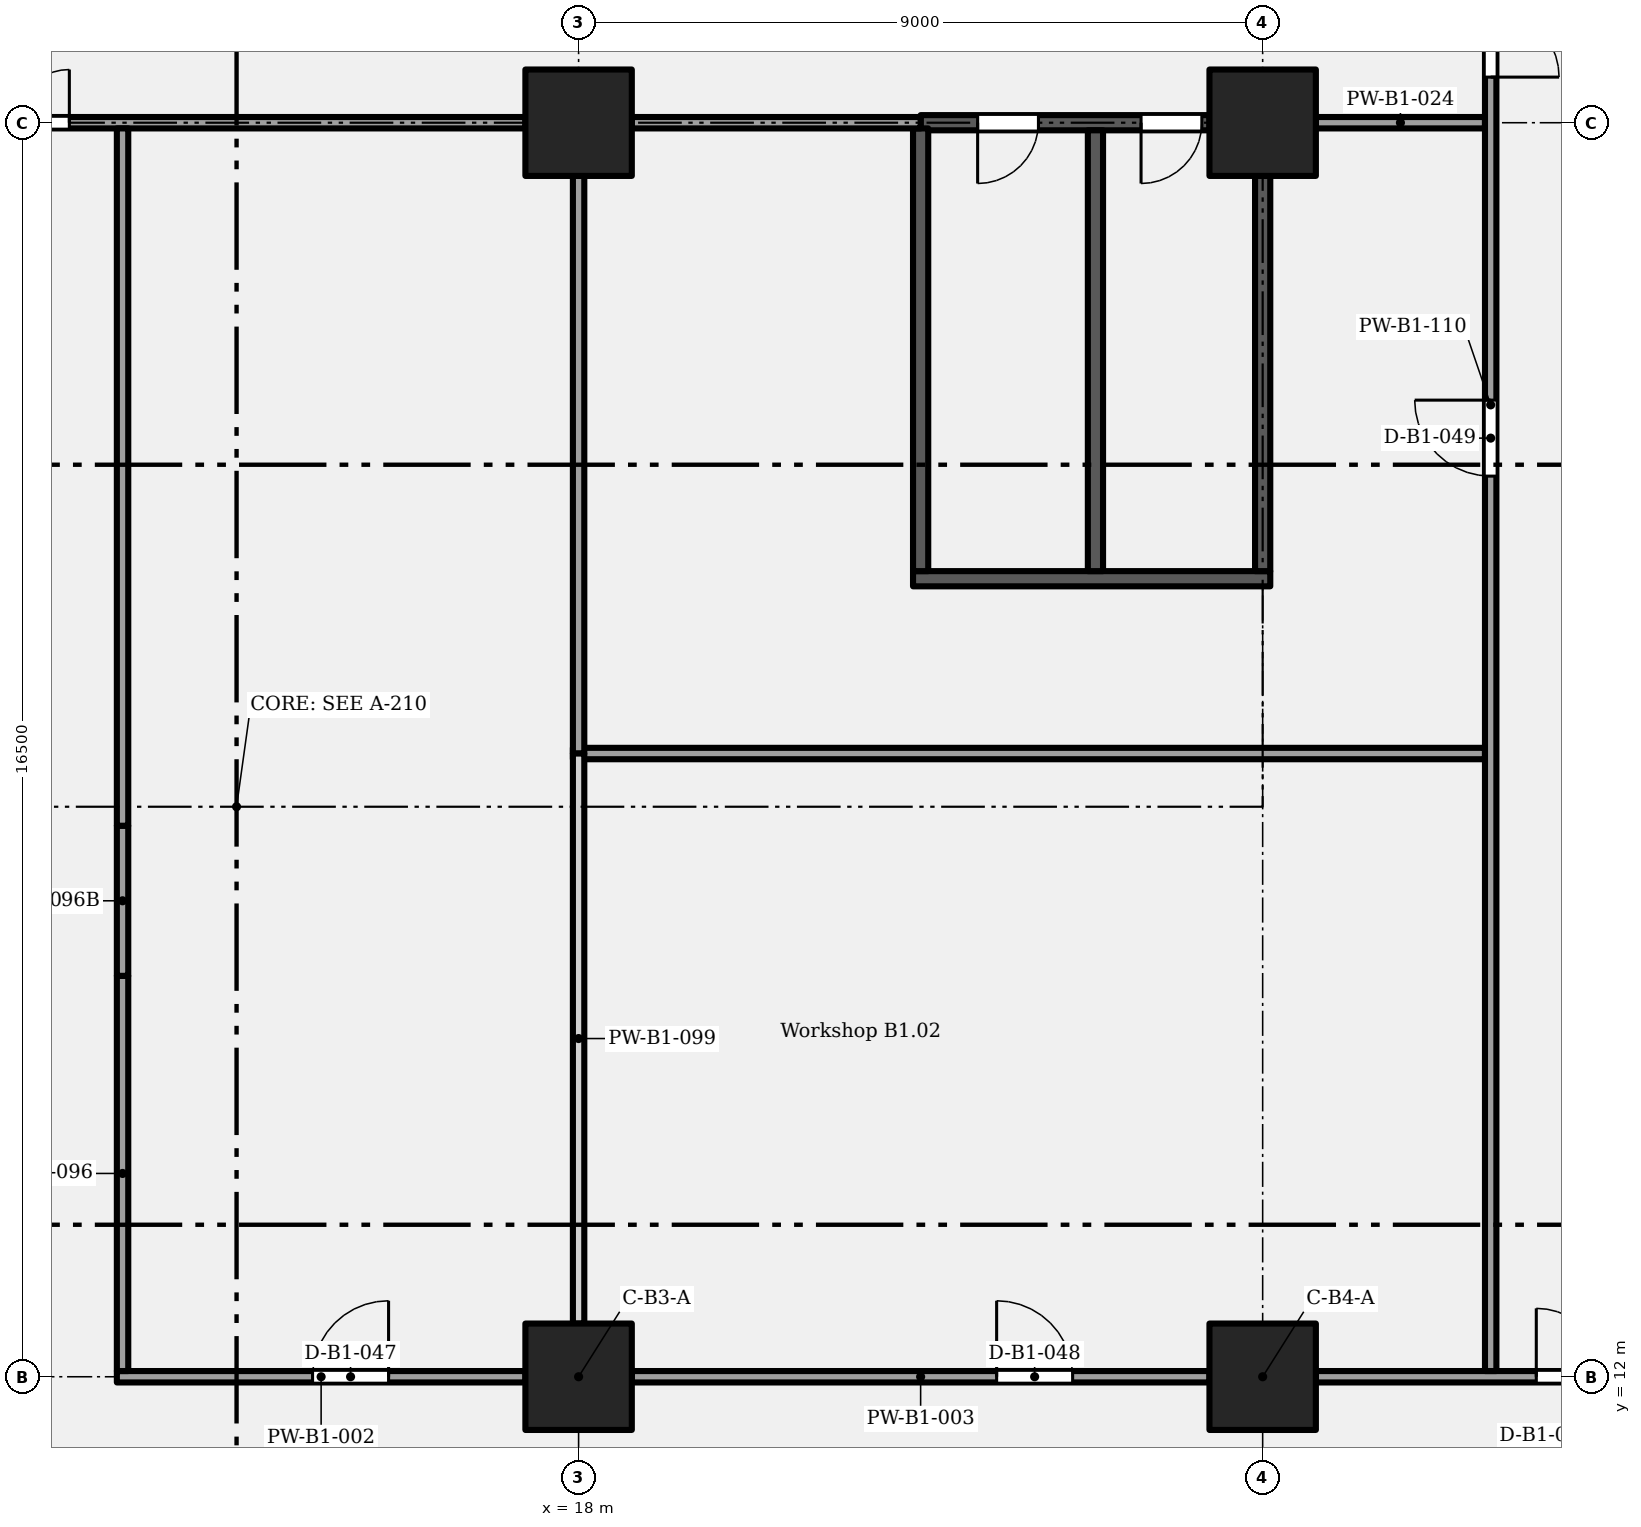
"""IFC4 building model, lengths in metres.
Left out: names, types, materials, properties, quantities, classifications, styles, units other than length and angle.
Written with IfcOpenShell. Run it as: python <this file> out.ifc"""

import sys

from ifc_helpers import new_model, si_unit, direction, frame, frame_2d, origin, origin_2d, place, context, subcontext, project, spatial, rectangle, extrude, element, fill, save


model = new_model("IFC4")
c1 = context("Model", 3, precision=1e-05, world=origin(), true_north=direction((0.0, 1.0)))
c2 = subcontext(c1, "Body", "Model", "MODEL_VIEW")
j1 = project(units=[si_unit("LENGTHUNIT", "METRE"), si_unit("PLANEANGLEUNIT", "RADIAN")], contexts=[c1])
p1 = place(None, origin())
s1 = spatial("IfcSite", under=j1, at=p1, CompositionType="ELEMENT")
p2 = place(p1, origin())
s2 = spatial("IfcBuilding", under=s1, at=p2, CompositionType="ELEMENT")
p3 = place(p2, frame((0.0, 0.0, -4.2)))
s3 = spatial("IfcBuildingStorey", under=s2, at=p3, CompositionType="ELEMENT", Elevation=-4.2)
for number, where, z_axis, x_axis in (
    (1, (18.0, 12.0, 0.0), (0.0, 0.0, 1.0), (1.0, 0.0, 0.0)),
    (2, (27.0, 12.0, 0.0), (0.0, 0.0, 1.0), (1.0, 0.0, 0.0)),
    (3, (18.0, 28.5, 0.0), (0.0, 0.0, 1.0), (1.0, 0.0, 0.0)),
    (4, (27.0, 28.5, 0.0), (0.0, 0.0, 1.0), (1.0, 0.0, 0.0)),
):
    element("IfcColumn", number, at=place(p3, frame(where, z_axis=z_axis, x_axis=x_axis)), inside=s3, PredefinedType="COLUMN", context=c2, shape_type="SweptSolid", body=[
        extrude(rectangle(XDim=1.4, YDim=1.4, at=origin_2d()), origin(), (0.0, 0.0, 1.0), 4.2),
    ])
p4 = place(p3, frame((11.925, 12.0, 0.0), z_axis=(0.0, 0.0, 1.0), x_axis=(1.0, 0.0, 0.0)))
e5 = element("IfcWall", 5, at=p4, inside=s3, PredefinedType="PARTITIONING", context=c2, shape_type="SweptSolid", body=[
    extrude(rectangle(XDim=5.375, YDim=0.15, at=frame_2d((2.688, 0.0))), origin(), (0.0, 0.0, 1.0), 3.15),
])
p5 = place(p4, frame((2.575, 0.0, 0.0)))
e6 = element("IfcOpeningElement", 6, at=p5, cuts=e5, PredefinedType="OPENING", context=c2, shape_type="SweptSolid", body=[
    extrude(rectangle(XDim=1.0, YDim=2.1, at=frame_2d((0.5, 1.05))), frame((0.0, 0.085, 0.0), z_axis=(0.0, -1.0, 0.0), x_axis=(1.0, 0.0, 0.0)), (0.0, 0.0, 1.0), 0.17),
])
p6 = place(p3, frame((18.7, 12.0, 0.0), z_axis=(0.0, 0.0, 1.0), x_axis=(1.0, 0.0, 0.0)))
e7 = element("IfcWall", 7, at=p6, inside=s3, PredefinedType="PARTITIONING", context=c2, shape_type="SweptSolid", body=[
    extrude(rectangle(XDim=7.6, YDim=0.15, at=frame_2d((3.8, 0.0))), origin(), (0.0, 0.0, 1.0), 3.15),
])
p7 = place(p6, frame((4.8, 0.0, 0.0)))
e8 = element("IfcOpeningElement", 8, at=p7, cuts=e7, PredefinedType="OPENING", context=c2, shape_type="SweptSolid", body=[
    extrude(rectangle(XDim=1.0, YDim=2.1, at=frame_2d((0.5, 1.05))), frame((0.0, 0.085, 0.0), z_axis=(0.0, -1.0, 0.0), x_axis=(1.0, 0.0, 0.0)), (0.0, 0.0, 1.0), 0.17),
])
p8 = place(p3, frame((27.7, 12.0, 0.0), z_axis=(0.0, 0.0, 1.0), x_axis=(1.0, 0.0, 0.0)))
e9 = element("IfcWall", 9, at=p8, inside=s3, PredefinedType="PARTITIONING", context=c2, shape_type="SweptSolid", body=[
    extrude(rectangle(XDim=7.75, YDim=0.15, at=frame_2d((3.875, 0.0))), origin(), (0.0, 0.0, 1.0), 3.15),
])
p9 = place(p8, frame((2.9, 0.0, 0.0)))
e10 = element("IfcOpeningElement", 10, at=p9, cuts=e9, PredefinedType="OPENING", context=c2, shape_type="SweptSolid", body=[
    extrude(rectangle(XDim=1.8, YDim=2.1, at=frame_2d((0.9, 1.05))), frame((0.0, 0.085, 0.0), z_axis=(0.0, -1.0, 0.0), x_axis=(1.0, 0.0, 0.0)), (0.0, 0.0, 1.0), 0.17),
])
p10 = place(p3, frame((17.925, 20.2, 0.0), z_axis=(0.0, 0.0, 1.0), x_axis=(1.0, 0.0, 0.0)))
e11 = element("IfcWall", 11, at=p10, inside=s3, PredefinedType="PARTITIONING", context=c2, shape_type="SweptSolid", body=[
    extrude(rectangle(XDim=12.0, YDim=0.15, at=frame_2d((6.0, 0.0))), origin(), (0.0, 0.0, 1.0), 3.9),
])
p11 = place(p3, frame((22.4, 22.5, 0.0), z_axis=(0.0, 0.0, 1.0), x_axis=(1.0, 0.0, 0.0)))
e12 = element("IfcWall", 12, at=p11, inside=s3, PredefinedType="SHEAR", context=c2, shape_type="SweptSolid", body=[
    extrude(rectangle(XDim=4.7, YDim=0.2, at=frame_2d((2.35, 0.0))), origin(), (0.0, 0.0, 1.0), 3.9),
])
p12 = place(p3, frame((9.7, 28.5, 0.0), z_axis=(0.0, 0.0, 1.0), x_axis=(1.0, 0.0, 0.0)))
e13 = element("IfcWall", 13, at=p12, inside=s3, PredefinedType="PARTITIONING", context=c2, shape_type="SweptSolid", body=[
    extrude(rectangle(XDim=7.6, YDim=0.15, at=frame_2d((3.8, 0.0))), origin(), (0.0, 0.0, 1.0), 3.15),
])
p13 = place(p12, frame((0.2, 0.0, 0.0)))
e14 = element("IfcOpeningElement", 14, at=p13, cuts=e13, PredefinedType="OPENING", context=c2, shape_type="SweptSolid", body=[
    extrude(rectangle(XDim=1.4, YDim=2.1, at=frame_2d((0.7, 1.05))), frame((0.0, 0.085, 0.0), z_axis=(0.0, -1.0, 0.0), x_axis=(1.0, 0.0, 0.0)), (0.0, 0.0, 1.0), 0.17),
])
p14 = place(p3, frame((18.7, 28.5, 0.0), z_axis=(0.0, 0.0, 1.0), x_axis=(1.0, 0.0, 0.0)))
e15 = element("IfcWall", 15, at=p14, inside=s3, PredefinedType="PARTITIONING", context=c2, shape_type="SweptSolid", body=[
    extrude(rectangle(XDim=3.8, YDim=0.15, at=frame_2d((1.9, 0.0))), origin(), (0.0, 0.0, 1.0), 3.15),
])
p15 = place(p3, frame((22.5, 28.5, 0.0), z_axis=(0.0, 0.0, 1.0), x_axis=(1.0, 0.0, 0.0)))
e16 = element("IfcWall", 16, at=p15, inside=s3, PredefinedType="SHEAR", context=c2, shape_type="SweptSolid", body=[
    extrude(rectangle(XDim=3.8, YDim=0.2, at=frame_2d((1.9, 0.0))), origin(), (0.0, 0.0, 1.0), 3.9),
])
p16 = place(p15, frame((1.55, 0.0, 0.0), z_axis=(0.0, 0.0, 1.0), x_axis=(-1.0, 0.0, 0.0)))
e17 = element("IfcOpeningElement", 17, at=p16, cuts=e16, PredefinedType="OPENING", context=c2, shape_type="SweptSolid", body=[
    extrude(rectangle(XDim=0.8, YDim=2.0, at=frame_2d((0.4, 1.0))), frame((0.0, 0.11, 0.0), z_axis=(0.0, -1.0, 0.0), x_axis=(1.0, 0.0, 0.0)), (0.0, 0.0, 1.0), 0.22),
])
p17 = place(p15, frame((3.7, 0.0, 0.0), z_axis=(0.0, 0.0, 1.0), x_axis=(-1.0, 0.0, 0.0)))
e18 = element("IfcOpeningElement", 18, at=p17, cuts=e16, PredefinedType="OPENING", context=c2, shape_type="SweptSolid", body=[
    extrude(rectangle(XDim=0.8, YDim=2.0, at=frame_2d((0.4, 1.0))), frame((0.0, 0.11, 0.0), z_axis=(0.0, -1.0, 0.0), x_axis=(1.0, 0.0, 0.0)), (0.0, 0.0, 1.0), 0.22),
])
p18 = place(p3, frame((27.7, 28.5, 0.0), z_axis=(0.0, 0.0, 1.0), x_axis=(1.0, 0.0, 0.0)))
e19 = element("IfcWall", 19, at=p18, inside=s3, PredefinedType="PARTITIONING", context=c2, shape_type="SweptSolid", body=[
    extrude(rectangle(XDim=2.225, YDim=0.15, at=frame_2d((1.113, 0.0))), origin(), (0.0, 0.0, 1.0), 3.15),
])
p19 = place(p3, frame((12.0, 12.075, 0.0), z_axis=(0.0, 0.0, 1.0), x_axis=(0.0, 1.0, 0.0)))
e20 = element("IfcWall", 20, at=p19, inside=s3, PredefinedType="PARTITIONING", context=c2, shape_type="SweptSolid", body=[
    extrude(rectangle(XDim=5.2, YDim=0.15, at=frame_2d((2.6, 0.0))), origin(), (0.0, 0.0, 1.0), 3.9),
])
p20 = place(p3, frame((18.0, 12.7, 0.0), z_axis=(0.0, 0.0, 1.0), x_axis=(0.0, 1.0, 0.0)))
e21 = element("IfcWall", 21, at=p20, inside=s3, PredefinedType="PARTITIONING", context=c2, shape_type="SweptSolid", body=[
    extrude(rectangle(XDim=7.5, YDim=0.15, at=frame_2d((3.75, 0.0))), origin(), (0.0, 0.0, 1.0), 2.95),
])
p21 = place(p3, frame((18.0, 20.2, 0.0), z_axis=(0.0, 0.0, 1.0), x_axis=(0.0, 1.0, 0.0)))
e22 = element("IfcWall", 22, at=p21, inside=s3, PredefinedType="PARTITIONING", context=c2, shape_type="SweptSolid", body=[
    extrude(rectangle(XDim=7.6, YDim=0.15, at=frame_2d((3.8, 0.0))), origin(), (0.0, 0.0, 1.0), 2.95),
])
p22 = place(p3, frame((22.5, 22.6, 0.0), z_axis=(0.0, 0.0, 1.0), x_axis=(0.0, 1.0, 0.0)))
e23 = element("IfcWall", 23, at=p22, inside=s3, PredefinedType="SHEAR", context=c2, shape_type="SweptSolid", body=[
    extrude(rectangle(XDim=5.825, YDim=0.2, at=frame_2d((2.913, 0.0))), origin(), (0.0, 0.0, 1.0), 3.9),
])
p23 = place(p3, frame((24.8, 22.6, 0.0), z_axis=(0.0, 0.0, 1.0), x_axis=(0.0, 1.0, 0.0)))
e24 = element("IfcWall", 24, at=p23, inside=s3, PredefinedType="SHEAR", context=c2, shape_type="SweptSolid", body=[
    extrude(rectangle(XDim=5.8, YDim=0.2, at=frame_2d((2.9, 0.0))), origin(), (0.0, 0.0, 1.0), 3.9),
])
p24 = place(p3, frame((27.0, 22.6, 0.0), z_axis=(0.0, 0.0, 1.0), x_axis=(0.0, 1.0, 0.0)))
e25 = element("IfcWall", 25, at=p24, inside=s3, PredefinedType="SHEAR", context=c2, shape_type="SweptSolid", body=[
    extrude(rectangle(XDim=5.2, YDim=0.2, at=frame_2d((2.6, 0.0))), origin(), (0.0, 0.0, 1.0), 3.9),
])
p25 = place(p3, frame((30.0, 12.075, 0.0), z_axis=(0.0, 0.0, 1.0), x_axis=(0.0, 1.0, 0.0)))
e26 = element("IfcWall", 26, at=p25, inside=s3, PredefinedType="PARTITIONING", context=c2, shape_type="SweptSolid", body=[
    extrude(rectangle(XDim=25.425, YDim=0.15, at=frame_2d((12.712, 0.0))), origin(), (0.0, 0.0, 1.0), 3.9),
])
p26 = place(p25, frame((18.825, 0.0, 0.0), z_axis=(0.0, 0.0, 1.0), x_axis=(-1.0, 0.0, 0.0)))
e27 = element("IfcOpeningElement", 27, at=p26, cuts=e26, PredefinedType="OPENING", context=c2, shape_type="SweptSolid", body=[
    extrude(rectangle(XDim=1.8, YDim=2.1, at=frame_2d((0.9, 1.05))), frame((0.0, 0.085, 0.0), z_axis=(0.0, -1.0, 0.0), x_axis=(1.0, 0.0, 0.0)), (0.0, 0.0, 1.0), 0.17),
])
p27 = place(p25, frame((11.775, 0.0, 0.0)))
e28 = element("IfcOpeningElement", 28, at=p27, cuts=e26, PredefinedType="OPENING", context=c2, shape_type="SweptSolid", body=[
    extrude(rectangle(XDim=1.0, YDim=2.1, at=frame_2d((0.5, 1.05))), frame((0.0, 0.085, 0.0), z_axis=(0.0, -1.0, 0.0), x_axis=(1.0, 0.0, 0.0)), (0.0, 0.0, 1.0), 0.17),
])
p28 = place(p3, frame((12.0, 17.275, 0.0), z_axis=(0.0, 0.0, 1.0), x_axis=(0.0, 1.0, 0.0)))
e29 = element("IfcWall", 29, at=p28, inside=s3, PredefinedType="PARTITIONING", context=c2, shape_type="SweptSolid", body=[
    extrude(rectangle(XDim=1.975, YDim=0.15, at=frame_2d((0.988, 0.0))), origin(), (0.0, 0.0, 1.0), 3.4),
])
p29 = place(p3, frame((12.0, 19.25, 0.0), z_axis=(0.0, 0.0, 1.0), x_axis=(0.0, 1.0, 0.0)))
e30 = element("IfcWall", 30, at=p29, inside=s3, PredefinedType="PARTITIONING", context=c2, shape_type="SweptSolid", body=[
    extrude(rectangle(XDim=9.175, YDim=0.15, at=frame_2d((4.587, 0.0))), origin(), (0.0, 0.0, 1.0), 3.9),
])
p30 = place(p13, origin())
e31 = element("IfcDoor", 31, at=p30, inside=s3, OperationType="DOUBLE_DOOR_SINGLE_SWING", PredefinedType="DOOR", context=c2, shape_type="SweptSolid", body=[
    extrude(rectangle(XDim=1.4, YDim=2.1, at=frame_2d((0.7, 1.05))), frame((0.0, 0.025, 0.0), z_axis=(0.0, -1.0, 0.0), x_axis=(1.0, 0.0, 0.0)), (0.0, 0.0, 1.0), 0.05),
])
fill(e14, e31)
p31 = place(p9, origin())
e32 = element("IfcDoor", 32, at=p31, inside=s3, OperationType="DOUBLE_DOOR_SINGLE_SWING", PredefinedType="DOOR", context=c2, shape_type="SweptSolid", body=[
    extrude(rectangle(XDim=1.8, YDim=2.1, at=frame_2d((0.9, 1.05))), frame((0.0, 0.025, 0.0), z_axis=(0.0, -1.0, 0.0), x_axis=(1.0, 0.0, 0.0)), (0.0, 0.0, 1.0), 0.05),
])
fill(e10, e32)
p32 = place(p26, origin())
e33 = element("IfcDoor", 33, at=p32, inside=s3, OperationType="DOUBLE_DOOR_SINGLE_SWING", PredefinedType="DOOR", context=c2, shape_type="SweptSolid", body=[
    extrude(rectangle(XDim=1.8, YDim=2.1, at=frame_2d((0.9, 1.05))), frame((0.0, 0.025, 0.0), z_axis=(0.0, -1.0, 0.0), x_axis=(1.0, 0.0, 0.0)), (0.0, 0.0, 1.0), 0.05),
])
fill(e27, e33)
p33 = place(p5, origin())
e34 = element("IfcDoor", 34, at=p33, inside=s3, OperationType="SINGLE_SWING_RIGHT", PredefinedType="DOOR", context=c2, shape_type="SweptSolid", body=[
    extrude(rectangle(XDim=1.0, YDim=2.1, at=frame_2d((0.5, 1.05))), frame((0.0, 0.025, 0.0), z_axis=(0.0, -1.0, 0.0), x_axis=(1.0, 0.0, 0.0)), (0.0, 0.0, 1.0), 0.05),
])
fill(e6, e34)
p34 = place(p7, origin())
e35 = element("IfcDoor", 35, at=p34, inside=s3, OperationType="SINGLE_SWING_LEFT", PredefinedType="DOOR", context=c2, shape_type="SweptSolid", body=[
    extrude(rectangle(XDim=1.0, YDim=2.1, at=frame_2d((0.5, 1.05))), frame((0.0, 0.025, 0.0), z_axis=(0.0, -1.0, 0.0), x_axis=(1.0, 0.0, 0.0)), (0.0, 0.0, 1.0), 0.05),
])
fill(e8, e35)
p35 = place(p27, origin())
e36 = element("IfcDoor", 36, at=p35, inside=s3, OperationType="SINGLE_SWING_RIGHT", PredefinedType="DOOR", context=c2, shape_type="SweptSolid", body=[
    extrude(rectangle(XDim=1.0, YDim=2.1, at=frame_2d((0.5, 1.05))), frame((0.0, 0.025, 0.0), z_axis=(0.0, -1.0, 0.0), x_axis=(1.0, 0.0, 0.0)), (0.0, 0.0, 1.0), 0.05),
])
fill(e28, e36)
p36 = place(p16, origin())
e37 = element("IfcDoor", 37, at=p36, inside=s3, OperationType="SINGLE_SWING_RIGHT", PredefinedType="DOOR", context=c2, shape_type="SweptSolid", body=[
    extrude(rectangle(XDim=0.8, YDim=2.0, at=frame_2d((0.4, 1.0))), frame((0.0, 0.025, 0.0), z_axis=(0.0, -1.0, 0.0), x_axis=(1.0, 0.0, 0.0)), (0.0, 0.0, 1.0), 0.05),
])
fill(e17, e37)
p37 = place(p17, origin())
e38 = element("IfcDoor", 38, at=p37, inside=s3, OperationType="SINGLE_SWING_RIGHT", PredefinedType="DOOR", context=c2, shape_type="SweptSolid", body=[
    extrude(rectangle(XDim=0.8, YDim=2.0, at=frame_2d((0.4, 1.0))), frame((0.0, 0.025, 0.0), z_axis=(0.0, -1.0, 0.0), x_axis=(1.0, 0.0, 0.0)), (0.0, 0.0, 1.0), 0.05),
])
fill(e18, e38)
save(model, sys.argv[1])
